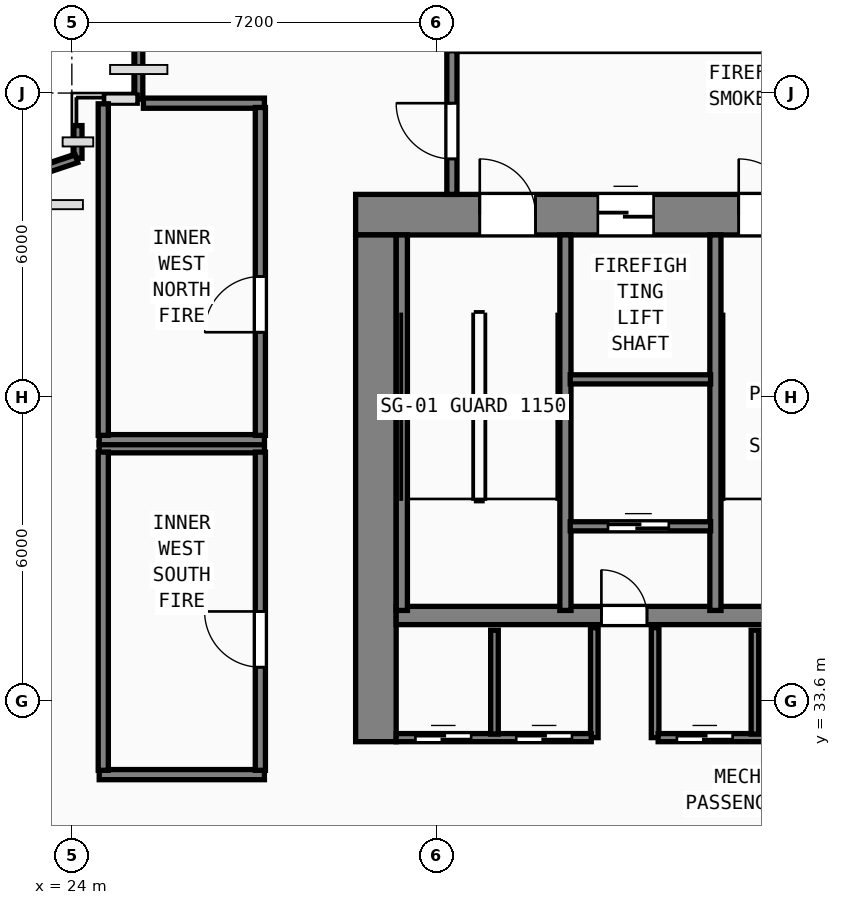
"""IFC4 building model, lengths in metres.
Left out: names, types, materials, properties, quantities, classifications, styles, units other than length and angle.
Written with IfcOpenShell. Run it as: python <this file> out.ifc"""

import sys

from ifc_helpers import new_model, si_unit, direction, frame, frame_2d, origin, origin_2d, place, context, subcontext, project, spatial, rectangle, hollow_rectangle, extrude, element, fill, save


model = new_model("IFC4")
c1 = context("Model", 3, precision=1e-05, world=origin(), true_north=direction((0.0, 1.0)))
c2 = subcontext(c1, "Body", "Model", "MODEL_VIEW")
j1 = project(units=[si_unit("LENGTHUNIT", "METRE"), si_unit("PLANEANGLEUNIT", "RADIAN")], contexts=[c1])
p1 = place(None, origin())
s1 = spatial("IfcSite", under=j1, at=p1, CompositionType="ELEMENT")
p2 = place(p1, origin())
s2 = spatial("IfcBuilding", under=s1, at=p2, CompositionType="ELEMENT")
p3 = place(p2, frame((0.0, 0.0, 43.0)))
s3 = spatial("IfcBuildingStorey", under=s2, at=p3, CompositionType="ELEMENT", Elevation=43.0)
p4 = place(p3, frame((29.6, 43.2, 0.0), z_axis=(0.0, 0.0, 1.0), x_axis=(1.0, 0.0, 0.0)))
e1 = element("IfcWall", 1, at=p4, inside=s3, PredefinedType="SHEAR", context=c2, shape_type="SweptSolid", body=[
    extrude(rectangle(XDim=17.6, YDim=0.8, at=frame_2d((8.8, 0.0))), origin(), (0.0, 0.0, 1.0), 4.4),
])
p5 = place(p4, frame((2.45, 0.0, 0.0)))
e2 = element("IfcOpeningElement", 2, at=p5, cuts=e1, PredefinedType="OPENING", context=c2, shape_type="SweptSolid", body=[
    extrude(rectangle(XDim=1.1, YDim=2.15, at=frame_2d((0.55, 1.075))), frame((0.0, 0.41, 0.0), z_axis=(0.0, -1.0, 0.0), x_axis=(1.0, 0.0, 0.0)), (0.0, 0.0, 1.0), 0.82),
])
p6 = place(p4, frame((7.56, 0.0, 0.0)))
e3 = element("IfcOpeningElement", 3, at=p6, cuts=e1, PredefinedType="OPENING", context=c2, shape_type="SweptSolid", body=[
    extrude(rectangle(XDim=1.1, YDim=2.15, at=frame_2d((0.55, 1.075))), frame((0.0, 0.41, 0.0), z_axis=(0.0, -1.0, 0.0), x_axis=(1.0, 0.0, 0.0)), (0.0, 0.0, 1.0), 0.82),
])
p7 = place(p4, frame((13.65, 0.0, 0.0)))
e4 = element("IfcOpeningElement", 4, at=p7, cuts=e1, PredefinedType="OPENING", context=c2, shape_type="SweptSolid", body=[
    extrude(rectangle(XDim=1.1, YDim=2.15, at=frame_2d((0.55, 1.075))), frame((0.0, 0.41, 0.0), z_axis=(0.0, -1.0, 0.0), x_axis=(1.0, 0.0, 0.0)), (0.0, 0.0, 1.0), 0.82),
])
p8 = place(p4, frame((4.78, 0.0, 0.0)))
e5 = element("IfcOpeningElement", 5, at=p8, cuts=e1, PredefinedType="OPENING", context=c2, shape_type="SweptSolid", body=[
    extrude(rectangle(XDim=1.1, YDim=2.2, at=frame_2d((0.55, 1.1))), frame((0.0, 0.41, 0.0), z_axis=(0.0, -1.0, 0.0), x_axis=(1.0, 0.0, 0.0)), (0.0, 0.0, 1.0), 0.82),
])
p9 = place(p4, frame((11.14, 0.0, 0.0)))
e6 = element("IfcOpeningElement", 6, at=p9, cuts=e1, PredefinedType="OPENING", context=c2, shape_type="SweptSolid", body=[
    extrude(rectangle(XDim=1.1, YDim=2.2, at=frame_2d((0.55, 1.1))), frame((0.0, 0.41, 0.0), z_axis=(0.0, -1.0, 0.0), x_axis=(1.0, 0.0, 0.0)), (0.0, 0.0, 1.0), 0.82),
])
p10 = place(p3, frame((30.0, 32.8, 0.0), z_axis=(0.0, 0.0, 1.0), x_axis=(0.0, 1.0, 0.0)))
e7 = element("IfcWall", 7, at=p10, inside=s3, PredefinedType="SHEAR", context=c2, shape_type="SweptSolid", body=[
    extrude(rectangle(XDim=10.0, YDim=0.8, at=frame_2d((5.0, 0.0))), origin(), (0.0, 0.0, 1.0), 4.4),
])
p11 = place(p3, frame((30.4, 35.29, 0.0), z_axis=(0.0, 0.0, 1.0), x_axis=(1.0, 0.0, 0.0)))
e8 = element("IfcWall", 8, at=p11, inside=s3, PredefinedType="SHEAR", context=c2, shape_type="SweptSolid", body=[
    extrude(rectangle(XDim=16.0, YDim=0.36, at=frame_2d((8.0, 0.0))), origin(), (0.0, 0.0, 1.0), 4.4),
])
p12 = place(p11, frame((4.95, 0.0, 0.0), z_axis=(0.0, 0.0, 1.0), x_axis=(-1.0, 0.0, 0.0)))
e9 = element("IfcOpeningElement", 9, at=p12, cuts=e8, PredefinedType="OPENING", context=c2, shape_type="SweptSolid", body=[
    extrude(rectangle(XDim=0.9, YDim=2.1, at=frame_2d((0.45, 1.05))), frame((0.0, 0.19, 0.0), z_axis=(0.0, -1.0, 0.0), x_axis=(1.0, 0.0, 0.0)), (0.0, 0.0, 1.0), 0.38),
])
p13 = place(p11, frame((12.01, 0.0, 0.0), z_axis=(0.0, 0.0, 1.0), x_axis=(-1.0, 0.0, 0.0)))
e10 = element("IfcOpeningElement", 10, at=p13, cuts=e8, PredefinedType="OPENING", context=c2, shape_type="SweptSolid", body=[
    extrude(rectangle(XDim=0.9, YDim=2.1, at=frame_2d((0.45, 1.05))), frame((0.0, 0.19, 0.0), z_axis=(0.0, -1.0, 0.0), x_axis=(1.0, 0.0, 0.0)), (0.0, 0.0, 1.0), 0.38),
])
for number, where, z_axis, x_axis in (
    (11, (30.512, 35.39, 0.0), (0.0, 0.0, 1.0), (0.0, 1.0, 0.0)),
    (12, (33.74, 35.39, 0.0), (0.0, 0.0, 1.0), (0.0, 1.0, 0.0)),
    (13, (36.7, 35.39, 0.0), (0.0, 0.0, 1.0), (0.0, 1.0, 0.0)),
):
    element("IfcWall", number, at=place(p3, frame(where, z_axis=z_axis, x_axis=x_axis)), inside=s3, PredefinedType="SHEAR", context=c2, shape_type="SweptSolid", body=[
        extrude(rectangle(XDim=7.41, YDim=0.22, at=frame_2d((3.705, 0.0))), origin(), (0.0, 0.0, 1.0), 4.4),
    ])
for number, where, z_axis, x_axis in (
    (14, (24.0, 33.6, 0.0), (0.0, 0.0, 1.0), (1.0, 0.0, 0.0)),
    (15, (24.0, 45.6, 0.0), (0.0, 0.0, 1.0), (1.0, 0.0, 0.0)),
):
    element("IfcColumn", number, at=place(p3, frame(where, z_axis=z_axis, x_axis=x_axis)), inside=s3, PredefinedType="COLUMN", context=c2, shape_type="SweptSolid", body=[
        extrude(hollow_rectangle(XDim=1.3, YDim=1.3, WallThickness=0.048, at=origin_2d()), origin(), (0.0, 0.0, 1.0), 4.6),
    ])
p14 = place(p3, frame((24.0, 39.6, 0.0), z_axis=(0.0, 0.0, 1.0), x_axis=(1.0, 0.0, 0.0)))
e16 = element("IfcColumn", 16, at=p14, inside=s3, PredefinedType="COLUMN", context=c2, shape_type="SweptSolid", body=[
    extrude(hollow_rectangle(XDim=1.0, YDim=1.0, WallThickness=0.038, at=origin_2d()), origin(), (0.0, 0.0, 1.0), 4.6),
])
p15 = place(p3, frame((25.32, 46.65, 0.0), z_axis=(0.0, 0.0, 1.0), x_axis=(0.0, -1.0, 0.0)))
e17 = element("IfcWall", 17, at=p15, inside=s3, PredefinedType="PARAPET", context=c2, shape_type="SweptSolid", body=[
    extrude(rectangle(XDim=1.17, YDim=0.16, at=frame_2d((0.585, 0.0))), origin(), (0.0, 0.0, 1.0), 1.15),
])
p16 = place(p3, frame((25.29, 45.48, 0.0), z_axis=(0.0, 0.0, 1.0), x_axis=(-1.0, 0.0, 0.0)))
e18 = element("IfcWall", 18, at=p16, inside=s3, PredefinedType="PARAPET", context=c2, shape_type="SweptSolid", body=[
    extrude(rectangle(XDim=0.648, YDim=0.16, at=frame_2d((0.324, 0.0))), origin(), (0.0, 0.0, 1.0), 1.15),
])
p17 = place(p3, frame((24.12, 44.958, 0.0), z_axis=(0.0, 0.0, 1.0), x_axis=(0.0, -1.0, 0.0)))
e19 = element("IfcWall", 19, at=p17, inside=s3, PredefinedType="PARAPET", context=c2, shape_type="SweptSolid", body=[
    extrude(rectangle(XDim=0.645, YDim=0.16, at=frame_2d((0.322, 0.0))), origin(), (0.0, 0.0, 1.0), 1.15),
])
p18 = place(p3, frame((24.092, 44.304, 0.0), z_axis=(0.0, 0.0, 1.0), x_axis=(-0.948683298051, -0.316227766017, 0.0)))
e20 = element("IfcWall", 20, at=p18, inside=s3, PredefinedType="PARAPET", context=c2, shape_type="SweptSolid", body=[
    extrude(rectangle(XDim=5.73, YDim=0.16, at=frame_2d((2.865, 0.0))), origin(), (0.0, 0.0, 1.0), 1.15),
])
p19 = place(p3, frame((31.5, 43.6, 0.0), z_axis=(0.0, 0.0, 1.0), x_axis=(0.0, 1.0, 0.0)))
e21 = element("IfcWall", 21, at=p19, inside=s3, PredefinedType="SOLIDWALL", context=c2, shape_type="SweptSolid", body=[
    extrude(rectangle(XDim=2.835, YDim=0.2, at=frame_2d((1.417, 0.0))), origin(), (0.0, 0.0, 1.0), 4.4),
])
p20 = place(p19, frame((1.8, 0.0, 0.0), z_axis=(0.0, 0.0, 1.0), x_axis=(-1.0, 0.0, 0.0)))
e22 = element("IfcOpeningElement", 22, at=p20, cuts=e21, PredefinedType="OPENING", context=c2, shape_type="SweptSolid", body=[
    extrude(rectangle(XDim=1.1, YDim=2.15, at=frame_2d((0.55, 1.075))), frame((0.0, 0.11, 0.0), z_axis=(0.0, -1.0, 0.0), x_axis=(1.0, 0.0, 0.0)), (0.0, 0.0, 1.0), 0.22),
])
p21 = place(p3, frame((33.835, 39.95, 0.0), z_axis=(0.0, 0.0, 1.0), x_axis=(1.0, 0.0, 0.0)))
e23 = element("IfcWall", 23, at=p21, inside=s3, PredefinedType="SOLIDWALL", context=c2, shape_type="SweptSolid", body=[
    extrude(rectangle(XDim=2.77, YDim=0.18, at=frame_2d((1.385, 0.0))), origin(), (0.0, 0.0, 1.0), 4.4),
])
p22 = place(p3, frame((33.835, 37.05, 0.0), z_axis=(0.0, 0.0, 1.0), x_axis=(1.0, 0.0, 0.0)))
e24 = element("IfcWall", 24, at=p22, inside=s3, PredefinedType="SOLIDWALL", context=c2, shape_type="SweptSolid", body=[
    extrude(rectangle(XDim=2.77, YDim=0.18, at=frame_2d((1.385, 0.0))), origin(), (0.0, 0.0, 1.0), 4.4),
])
p23 = place(p22, frame((1.945, 0.0, 0.0), z_axis=(0.0, 0.0, 1.0), x_axis=(-1.0, 0.0, 0.0)))
e25 = element("IfcOpeningElement", 25, at=p23, cuts=e24, PredefinedType="OPENING", context=c2, shape_type="SweptSolid", body=[
    extrude(rectangle(XDim=1.2, YDim=2.2, at=frame_2d((0.6, 1.1))), frame((0.0, 0.1, 0.0), z_axis=(0.0, -1.0, 0.0), x_axis=(1.0, 0.0, 0.0)), (0.0, 0.0, 1.0), 0.2),
])
for number, where, z_axis, x_axis in (
    (26, (34.31, 32.88, 0.0), (0.0, 0.0, 1.0), (0.0, 1.0, 0.0)),
    (27, (35.51, 32.88, 0.0), (0.0, 0.0, 1.0), (0.0, 1.0, 0.0)),
):
    element("IfcWall", number, at=place(p3, frame(where, z_axis=z_axis, x_axis=x_axis)), inside=s3, PredefinedType="SOLIDWALL", context=c2, shape_type="SweptSolid", body=[
        extrude(rectangle(XDim=2.17, YDim=0.15, at=frame_2d((1.085, 0.0))), origin(), (0.0, 0.0, 1.0), 4.4),
    ])
p24 = place(p3, frame((30.4, 32.88, 0.0), z_axis=(0.0, 0.0, 1.0), x_axis=(1.0, 0.0, 0.0)))
e28 = element("IfcWall", 28, at=p24, inside=s3, PredefinedType="SOLIDWALL", context=c2, shape_type="SweptSolid", body=[
    extrude(rectangle(XDim=3.85, YDim=0.16, at=frame_2d((1.925, 0.0))), origin(), (0.0, 0.0, 1.0), 4.4),
])
p25 = place(p24, frame((1.48, 0.0, 0.0), z_axis=(0.0, 0.0, 1.0), x_axis=(-1.0, 0.0, 0.0)))
e29 = element("IfcOpeningElement", 29, at=p25, cuts=e28, PredefinedType="OPENING", context=c2, shape_type="SweptSolid", body=[
    extrude(rectangle(XDim=1.1, YDim=2.2, at=frame_2d((0.55, 1.1))), frame((0.0, 0.09, 0.0), z_axis=(0.0, -1.0, 0.0), x_axis=(1.0, 0.0, 0.0)), (0.0, 0.0, 1.0), 0.18),
])
p26 = place(p24, frame((3.47, 0.0, 0.0), z_axis=(0.0, 0.0, 1.0), x_axis=(-1.0, 0.0, 0.0)))
e30 = element("IfcOpeningElement", 30, at=p26, cuts=e28, PredefinedType="OPENING", context=c2, shape_type="SweptSolid", body=[
    extrude(rectangle(XDim=1.1, YDim=2.2, at=frame_2d((0.55, 1.1))), frame((0.0, 0.09, 0.0), z_axis=(0.0, -1.0, 0.0), x_axis=(1.0, 0.0, 0.0)), (0.0, 0.0, 1.0), 0.18),
])
p27 = place(p3, frame((35.57, 32.88, 0.0), z_axis=(0.0, 0.0, 1.0), x_axis=(1.0, 0.0, 0.0)))
e31 = element("IfcWall", 31, at=p27, inside=s3, PredefinedType="SOLIDWALL", context=c2, shape_type="SweptSolid", body=[
    extrude(rectangle(XDim=5.74, YDim=0.16, at=frame_2d((2.87, 0.0))), origin(), (0.0, 0.0, 1.0), 4.4),
])
p28 = place(p27, frame((1.47, 0.0, 0.0), z_axis=(0.0, 0.0, 1.0), x_axis=(-1.0, 0.0, 0.0)))
e32 = element("IfcOpeningElement", 32, at=p28, cuts=e31, PredefinedType="OPENING", context=c2, shape_type="SweptSolid", body=[
    extrude(rectangle(XDim=1.1, YDim=2.2, at=frame_2d((0.55, 1.1))), frame((0.0, 0.09, 0.0), z_axis=(0.0, -1.0, 0.0), x_axis=(1.0, 0.0, 0.0)), (0.0, 0.0, 1.0), 0.18),
])
p29 = place(p27, frame((3.46, 0.0, 0.0), z_axis=(0.0, 0.0, 1.0), x_axis=(-1.0, 0.0, 0.0)))
e33 = element("IfcOpeningElement", 33, at=p29, cuts=e31, PredefinedType="OPENING", context=c2, shape_type="SweptSolid", body=[
    extrude(rectangle(XDim=1.1, YDim=2.2, at=frame_2d((0.55, 1.1))), frame((0.0, 0.09, 0.0), z_axis=(0.0, -1.0, 0.0), x_axis=(1.0, 0.0, 0.0)), (0.0, 0.0, 1.0), 0.18),
])
for number, where, z_axis, x_axis in (
    (34, (32.34, 32.95, 0.0), (0.0, 0.0, 1.0), (0.0, 1.0, 0.0)),
    (35, (37.48, 32.95, 0.0), (0.0, 0.0, 1.0), (0.0, 1.0, 0.0)),
):
    element("IfcWall", number, at=place(p3, frame(where, z_axis=z_axis, x_axis=x_axis)), inside=s3, PredefinedType="SOLIDWALL", context=c2, shape_type="SweptSolid", body=[
        extrude(rectangle(XDim=2.05, YDim=0.15, at=frame_2d((1.025, 0.0))), origin(), (0.0, 0.0, 1.0), 4.4),
    ])
for number, where, z_axis, x_axis in (
    (36, (24.54, 38.6, 0.0), (0.0, 0.0, 1.0), (1.0, 0.0, 0.0)),
    (37, (24.54, 32.15, 0.0), (0.0, 0.0, 1.0), (1.0, 0.0, 0.0)),
):
    element("IfcWall", number, at=place(p3, frame(where, z_axis=z_axis, x_axis=x_axis)), inside=s3, PredefinedType="SOLIDWALL", context=c2, shape_type="SweptSolid", body=[
        extrude(rectangle(XDim=3.26, YDim=0.2, at=frame_2d((1.63, 0.0))), origin(), (0.0, 0.0, 1.0), 4.4),
    ])
p30 = place(p3, frame((24.62, 32.235, 0.0), z_axis=(0.0, 0.0, 1.0), x_axis=(0.0, 1.0, 0.0)))
e38 = element("IfcWall", 38, at=p30, inside=s3, PredefinedType="SOLIDWALL", context=c2, shape_type="SweptSolid", body=[
    extrude(rectangle(XDim=6.28, YDim=0.2, at=frame_2d((3.14, 0.0))), origin(), (0.0, 0.0, 1.0), 4.4),
])
p31 = place(p3, frame((27.72, 32.235, 0.0), z_axis=(0.0, 0.0, 1.0), x_axis=(0.0, 1.0, 0.0)))
e39 = element("IfcWall", 39, at=p31, inside=s3, PredefinedType="SOLIDWALL", context=c2, shape_type="SweptSolid", body=[
    extrude(rectangle(XDim=6.28, YDim=0.2, at=frame_2d((3.14, 0.0))), origin(), (0.0, 0.0, 1.0), 4.4),
])
p32 = place(p31, frame((3.135, 0.0, 0.0), z_axis=(0.0, 0.0, 1.0), x_axis=(-1.0, 0.0, 0.0)))
e40 = element("IfcOpeningElement", 40, at=p32, cuts=e39, PredefinedType="OPENING", context=c2, shape_type="SweptSolid", body=[
    extrude(rectangle(XDim=1.1, YDim=2.15, at=frame_2d((0.55, 1.075))), frame((0.0, 0.11, 0.0), z_axis=(0.0, -1.0, 0.0), x_axis=(1.0, 0.0, 0.0)), (0.0, 0.0, 1.0), 0.22),
])
p33 = place(p3, frame((25.412, 45.4, 0.0), z_axis=(0.0, 0.0, 1.0), x_axis=(1.0, 0.0, 0.0)))
e41 = element("IfcWall", 41, at=p33, inside=s3, PredefinedType="SOLIDWALL", context=c2, shape_type="SweptSolid", body=[
    extrude(rectangle(XDim=2.388, YDim=0.2, at=frame_2d((1.194, 0.0))), origin(), (0.0, 0.0, 1.0), 4.4),
])
p34 = place(p3, frame((24.54, 38.76, 0.0), z_axis=(0.0, 0.0, 1.0), x_axis=(1.0, 0.0, 0.0)))
e42 = element("IfcWall", 42, at=p34, inside=s3, PredefinedType="SOLIDWALL", context=c2, shape_type="SweptSolid", body=[
    extrude(rectangle(XDim=3.26, YDim=0.2, at=frame_2d((1.63, 0.0))), origin(), (0.0, 0.0, 1.0), 4.4),
])
p35 = place(p3, frame((24.62, 38.845, 0.0), z_axis=(0.0, 0.0, 1.0), x_axis=(0.0, 1.0, 0.0)))
e43 = element("IfcWall", 43, at=p35, inside=s3, PredefinedType="SOLIDWALL", context=c2, shape_type="SweptSolid", body=[
    extrude(rectangle(XDim=6.543, YDim=0.2, at=frame_2d((3.271, 0.0))), origin(), (0.0, 0.0, 1.0), 4.4),
])
p36 = place(p3, frame((27.72, 38.845, 0.0), z_axis=(0.0, 0.0, 1.0), x_axis=(0.0, 1.0, 0.0)))
e44 = element("IfcWall", 44, at=p36, inside=s3, PredefinedType="SOLIDWALL", context=c2, shape_type="SweptSolid", body=[
    extrude(rectangle(XDim=6.47, YDim=0.2, at=frame_2d((3.235, 0.0))), origin(), (0.0, 0.0, 1.0), 4.4),
])
p37 = place(p36, frame((3.135, 0.0, 0.0), z_axis=(0.0, 0.0, 1.0), x_axis=(-1.0, 0.0, 0.0)))
e45 = element("IfcOpeningElement", 45, at=p37, cuts=e44, PredefinedType="OPENING", context=c2, shape_type="SweptSolid", body=[
    extrude(rectangle(XDim=1.1, YDim=2.15, at=frame_2d((0.55, 1.075))), frame((0.0, 0.11, 0.0), z_axis=(0.0, -1.0, 0.0), x_axis=(1.0, 0.0, 0.0)), (0.0, 0.0, 1.0), 0.22),
])
p38 = place(p5, origin())
e46 = element("IfcDoor", 46, at=p38, inside=s3, OperationType="SINGLE_SWING_LEFT", PredefinedType="DOOR", context=c2, shape_type="SweptSolid", body=[
    extrude(rectangle(XDim=1.1, YDim=2.15, at=frame_2d((0.55, 1.075))), frame((0.0, 0.185, 0.0), z_axis=(0.0, -1.0, 0.0), x_axis=(1.0, 0.0, 0.0)), (0.0, 0.0, 1.0), 0.05),
])
fill(e2, e46)
p39 = place(p6, origin())
e47 = element("IfcDoor", 47, at=p39, inside=s3, OperationType="SINGLE_SWING_LEFT", PredefinedType="DOOR", context=c2, shape_type="SweptSolid", body=[
    extrude(rectangle(XDim=1.1, YDim=2.15, at=frame_2d((0.55, 1.075))), frame((0.0, 0.185, 0.0), z_axis=(0.0, -1.0, 0.0), x_axis=(1.0, 0.0, 0.0)), (0.0, 0.0, 1.0), 0.05),
])
fill(e3, e47)
p40 = place(p20, origin())
e48 = element("IfcDoor", 48, at=p40, inside=s3, OperationType="SINGLE_SWING_LEFT", PredefinedType="DOOR", context=c2, shape_type="SweptSolid", body=[
    extrude(rectangle(XDim=1.1, YDim=2.15, at=frame_2d((0.55, 1.075))), frame((0.0, 0.025, 0.0), z_axis=(0.0, -1.0, 0.0), x_axis=(1.0, 0.0, 0.0)), (0.0, 0.0, 1.0), 0.05),
])
fill(e22, e48)
p41 = place(p8, origin())
e49 = element("IfcDoor", 49, at=p41, inside=s3, OperationType="SLIDING_TO_LEFT", PredefinedType="DOOR", context=c2, shape_type="SweptSolid", body=[
    extrude(rectangle(XDim=1.1, YDim=2.2, at=frame_2d((0.55, 1.1))), frame((0.0, 0.185, 0.0), z_axis=(0.0, -1.0, 0.0), x_axis=(1.0, 0.0, 0.0)), (0.0, 0.0, 1.0), 0.05),
])
fill(e5, e49)
p42 = place(p23, origin())
e50 = element("IfcDoor", 50, at=p42, inside=s3, OperationType="SLIDING_TO_RIGHT", PredefinedType="DOOR", context=c2, shape_type="SweptSolid", body=[
    extrude(rectangle(XDim=1.2, YDim=2.2, at=frame_2d((0.6, 1.1))), frame((0.0, 0.025, 0.0), z_axis=(0.0, -1.0, 0.0), x_axis=(1.0, 0.0, 0.0)), (0.0, 0.0, 1.0), 0.05),
])
fill(e25, e50)
p43 = place(p12, origin())
e51 = element("IfcDoor", 51, at=p43, inside=s3, OperationType="SINGLE_SWING_RIGHT", PredefinedType="DOOR", context=c2, shape_type="SweptSolid", body=[
    extrude(rectangle(XDim=0.9, YDim=2.1, at=frame_2d((0.45, 1.05))), frame((0.0, 0.025, 0.0), z_axis=(0.0, -1.0, 0.0), x_axis=(1.0, 0.0, 0.0)), (0.0, 0.0, 1.0), 0.05),
])
fill(e9, e51)
p44 = place(p25, origin())
e52 = element("IfcDoor", 52, at=p44, inside=s3, OperationType="SLIDING_TO_LEFT", PredefinedType="DOOR", context=c2, shape_type="SweptSolid", body=[
    extrude(rectangle(XDim=1.1, YDim=2.2, at=frame_2d((0.55, 1.1))), frame((0.0, 0.025, 0.0), z_axis=(0.0, -1.0, 0.0), x_axis=(1.0, 0.0, 0.0)), (0.0, 0.0, 1.0), 0.05),
])
fill(e29, e52)
p45 = place(p26, origin())
e53 = element("IfcDoor", 53, at=p45, inside=s3, OperationType="SLIDING_TO_LEFT", PredefinedType="DOOR", context=c2, shape_type="SweptSolid", body=[
    extrude(rectangle(XDim=1.1, YDim=2.2, at=frame_2d((0.55, 1.1))), frame((0.0, 0.025, 0.0), z_axis=(0.0, -1.0, 0.0), x_axis=(1.0, 0.0, 0.0)), (0.0, 0.0, 1.0), 0.05),
])
fill(e30, e53)
p46 = place(p28, origin())
e54 = element("IfcDoor", 54, at=p46, inside=s3, OperationType="SLIDING_TO_LEFT", PredefinedType="DOOR", context=c2, shape_type="SweptSolid", body=[
    extrude(rectangle(XDim=1.1, YDim=2.2, at=frame_2d((0.55, 1.1))), frame((0.0, 0.025, 0.0), z_axis=(0.0, -1.0, 0.0), x_axis=(1.0, 0.0, 0.0)), (0.0, 0.0, 1.0), 0.05),
])
fill(e32, e54)
p47 = place(p32, origin())
e55 = element("IfcDoor", 55, at=p47, inside=s3, OperationType="SINGLE_SWING_LEFT", PredefinedType="DOOR", context=c2, shape_type="SweptSolid", body=[
    extrude(rectangle(XDim=1.1, YDim=2.15, at=frame_2d((0.55, 1.075))), frame((0.0, 0.025, 0.0), z_axis=(0.0, -1.0, 0.0), x_axis=(1.0, 0.0, 0.0)), (0.0, 0.0, 1.0), 0.05),
])
fill(e40, e55)
p48 = place(p37, origin())
e56 = element("IfcDoor", 56, at=p48, inside=s3, OperationType="SINGLE_SWING_RIGHT", PredefinedType="DOOR", context=c2, shape_type="SweptSolid", body=[
    extrude(rectangle(XDim=1.1, YDim=2.15, at=frame_2d((0.55, 1.075))), frame((0.0, 0.025, 0.0), z_axis=(0.0, -1.0, 0.0), x_axis=(1.0, 0.0, 0.0)), (0.0, 0.0, 1.0), 0.05),
])
fill(e45, e56)
save(model, sys.argv[1])
